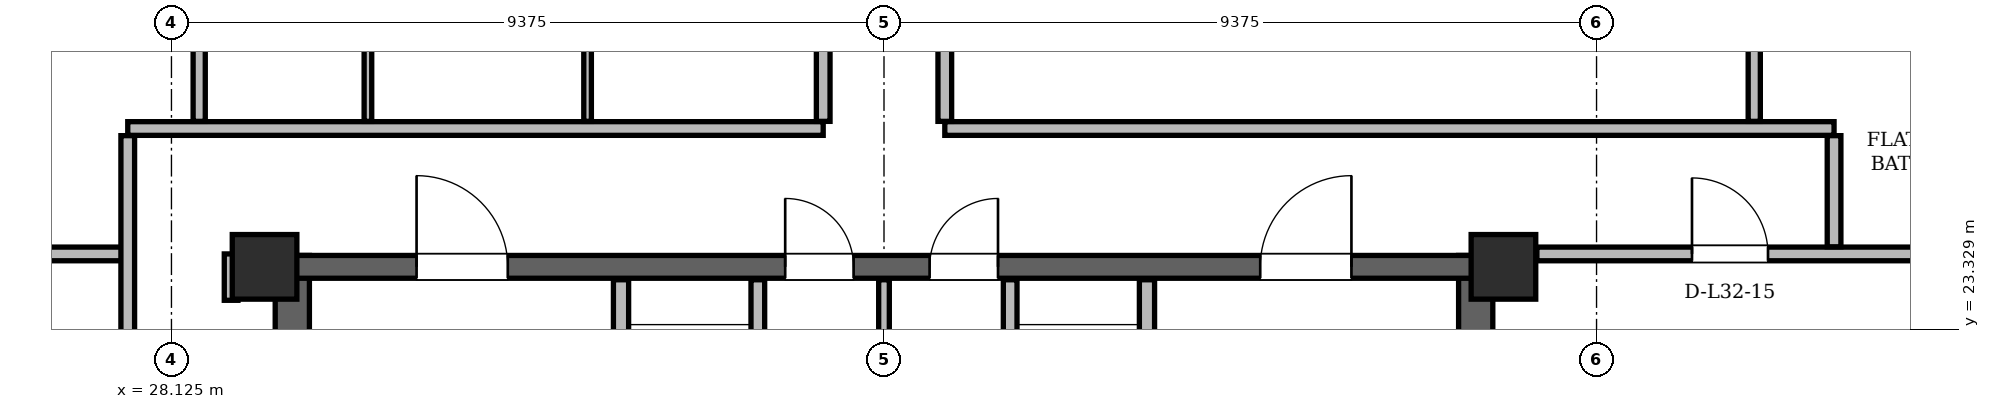
"""IFC4 building model, lengths in metres.
Left out: names, types, materials, properties, quantities, classifications, styles, units other than length and angle.
Written with IfcOpenShell. Run it as: python <this file> out.ifc"""

import sys

from ifc_helpers import new_model, si_unit, direction, frame, frame_2d, origin, origin_2d, place, context, subcontext, project, spatial, rectangle, hollow_rectangle, extrude, element, fill, save


model = new_model("IFC4")
c1 = context("Model", 3, precision=1e-05, world=origin(), true_north=direction((0.0, 1.0)))
c2 = subcontext(c1, "Body", "Model", "MODEL_VIEW")
j1 = project(units=[si_unit("LENGTHUNIT", "METRE"), si_unit("PLANEANGLEUNIT", "RADIAN")], contexts=[c1])
p1 = place(None, origin())
s1 = spatial("IfcSite", under=j1, at=p1, CompositionType="ELEMENT")
p2 = place(p1, origin())
s2 = spatial("IfcBuilding", under=s1, at=p2, CompositionType="ELEMENT")
p3 = place(p2, frame((0.0, 0.0, 123.0)))
s3 = spatial("IfcBuildingStorey", under=s2, at=p3, CompositionType="ELEMENT", Elevation=123.0)
for number, where, z_axis, x_axis in (
    (1, (45.65, 24.15, 0.0), (0.0, 0.0, 1.0), (1.0, 0.0, 0.0)),
    (2, (29.35, 24.15, 0.0), (0.0, 0.0, 1.0), (1.0, 0.0, 0.0)),
):
    element("IfcColumn", number, at=place(p3, frame(where, z_axis=z_axis, x_axis=x_axis)), inside=s3, PredefinedType="COLUMN", context=c2, shape_type="SweptSolid", body=[
        extrude(hollow_rectangle(XDim=0.85, YDim=0.85, WallThickness=0.07, at=origin_2d()), origin(), (0.0, 0.0, 1.0), 3.6),
    ])
for number, where, z_axis, x_axis in (
    (3, (29.715, 11.0, 0.0), (0.0, 0.0, 1.0), (0.0, 1.0, 0.0)),
    (4, (45.285, 11.0, 0.0), (0.0, 0.0, 1.0), (0.0, 1.0, 0.0)),
):
    element("IfcWall", number, at=place(p3, frame(where, z_axis=z_axis, x_axis=x_axis)), inside=s3, PredefinedType="SHEAR", context=c2, shape_type="SweptSolid", body=[
        extrude(rectangle(XDim=13.3, YDim=0.45, at=frame_2d((6.65, 0.0))), origin(), (0.0, 0.0, 1.0), 3.36),
    ])
p4 = place(p3, frame((29.65, 24.15, 0.0), z_axis=(0.0, 0.0, 1.0), x_axis=(1.0, 0.0, 0.0)))
e5 = element("IfcWall", 5, at=p4, inside=s3, PredefinedType="SHEAR", context=c2, shape_type="SweptSolid", body=[
    extrude(rectangle(XDim=15.7, YDim=0.3, at=frame_2d((7.85, 0.0))), origin(), (0.0, 0.0, 1.0), 3.36),
])
p5 = place(p4, frame((1.7, 0.0, 0.0)))
e6 = element("IfcOpeningElement", 6, at=p5, cuts=e5, PredefinedType="OPENING", context=c2, shape_type="SweptSolid", body=[
    extrude(rectangle(XDim=1.2, YDim=2.2, at=frame_2d((0.6, 1.1))), frame((0.0, 0.15, 0.0), z_axis=(0.0, -1.0, 0.0), x_axis=(1.0, 0.0, 0.0)), (0.0, 0.0, 1.0), 0.3),
])
p6 = place(p4, frame((12.8, 0.0, 0.0)))
e7 = element("IfcOpeningElement", 7, at=p6, cuts=e5, PredefinedType="OPENING", context=c2, shape_type="SweptSolid", body=[
    extrude(rectangle(XDim=1.2, YDim=2.2, at=frame_2d((0.6, 1.1))), frame((0.0, 0.15, 0.0), z_axis=(0.0, -1.0, 0.0), x_axis=(1.0, 0.0, 0.0)), (0.0, 0.0, 1.0), 0.3),
])
p7 = place(p4, frame((6.55, 0.0, 0.0)))
e8 = element("IfcOpeningElement", 8, at=p7, cuts=e5, PredefinedType="OPENING", context=c2, shape_type="SweptSolid", body=[
    extrude(rectangle(XDim=0.9, YDim=2.05, at=frame_2d((0.45, 1.025))), frame((0.0, 0.15, 0.0), z_axis=(0.0, -1.0, 0.0), x_axis=(1.0, 0.0, 0.0)), (0.0, 0.0, 1.0), 0.3),
])
p8 = place(p4, frame((8.45, 0.0, 0.0)))
e9 = element("IfcOpeningElement", 9, at=p8, cuts=e5, PredefinedType="OPENING", context=c2, shape_type="SweptSolid", body=[
    extrude(rectangle(XDim=0.9, YDim=2.05, at=frame_2d((0.45, 1.025))), frame((0.0, 0.15, 0.0), z_axis=(0.0, -1.0, 0.0), x_axis=(1.0, 0.0, 0.0)), (0.0, 0.0, 1.0), 0.3),
])
p9 = place(p3, frame((60.364, 13.107, 0.0), z_axis=(0.0, 0.0, 1.0), x_axis=(-0.499996370967, 0.866027498997, 0.0)))
e10 = element("IfcWall", 10, at=p9, inside=s3, PredefinedType="SOLIDWALL", context=c2, shape_type="SweptSolid", body=[
    extrude(rectangle(XDim=34.976, YDim=0.34, at=frame_2d((17.488, 0.0))), origin(), (0.0, 0.0, 1.0), 2.578),
])
p10 = place(p9, frame((8.034, 0.0, 0.0)))
e11 = element("IfcOpeningElement", 11, at=p10, cuts=e10, PredefinedType="OPENING", context=c2, shape_type="SweptSolid", body=[
    extrude(rectangle(XDim=1.5, YDim=2.2, at=frame_2d((0.75, 1.1))), frame((0.0, 0.17, 0.0), z_axis=(0.0, -1.0, 0.0), x_axis=(1.0, 0.0, 0.0)), (0.0, 0.0, 1.0), 0.34),
])
p11 = place(p9, frame((27.106, 0.0, 0.0)))
e12 = element("IfcOpeningElement", 12, at=p11, cuts=e10, PredefinedType="OPENING", context=c2, shape_type="SweptSolid", body=[
    extrude(rectangle(XDim=1.5, YDim=2.2, at=frame_2d((0.75, 1.1))), frame((0.0, 0.17, 0.0), z_axis=(0.0, -1.0, 0.0), x_axis=(1.0, 0.0, 0.0)), (0.0, 0.0, 1.0), 0.34),
])
p12 = place(p9, frame((3.285, 0.0, 0.85)))
e13 = element("IfcOpeningElement", 13, at=p12, cuts=e10, PredefinedType="OPENING", context=c2, shape_type="SweptSolid", body=[
    extrude(rectangle(XDim=1.2, YDim=1.48, at=frame_2d((0.6, 0.74))), frame((0.0, 0.17, 0.0), z_axis=(0.0, -1.0, 0.0), x_axis=(1.0, 0.0, 0.0)), (0.0, 0.0, 1.0), 0.34),
])
p13 = place(p9, frame((11.406, 0.0, 0.85)))
e14 = element("IfcOpeningElement", 14, at=p13, cuts=e10, PredefinedType="OPENING", context=c2, shape_type="SweptSolid", body=[
    extrude(rectangle(XDim=1.2, YDim=1.48, at=frame_2d((0.6, 0.74))), frame((0.0, 0.17, 0.0), z_axis=(0.0, -1.0, 0.0), x_axis=(1.0, 0.0, 0.0)), (0.0, 0.0, 1.0), 0.34),
])
p14 = place(p9, frame((31.066, 0.0, 0.85)))
e15 = element("IfcOpeningElement", 15, at=p14, cuts=e10, PredefinedType="OPENING", context=c2, shape_type="SweptSolid", body=[
    extrude(rectangle(XDim=2.2, YDim=1.618, at=frame_2d((1.1, 0.809))), frame((0.0, 0.17, 0.0), z_axis=(0.0, -1.0, 0.0), x_axis=(1.0, 0.0, 0.0)), (0.0, 0.0, 1.0), 0.34),
])
p15 = place(p9, frame((14.149, 0.0, 0.85)))
e16 = element("IfcOpeningElement", 16, at=p15, cuts=e10, PredefinedType="OPENING", context=c2, shape_type="SweptSolid", body=[
    extrude(rectangle(XDim=2.6, YDim=1.618, at=frame_2d((1.3, 0.809))), frame((0.0, 0.17, 0.0), z_axis=(0.0, -1.0, 0.0), x_axis=(1.0, 0.0, 0.0)), (0.0, 0.0, 1.0), 0.34),
])
p16 = place(p9, frame((18.924, 0.0, 0.85)))
e17 = element("IfcOpeningElement", 17, at=p16, cuts=e10, PredefinedType="OPENING", context=c2, shape_type="SweptSolid", body=[
    extrude(rectangle(XDim=2.0, YDim=1.618, at=frame_2d((1.0, 0.809))), frame((0.0, 0.17, 0.0), z_axis=(0.0, -1.0, 0.0), x_axis=(1.0, 0.0, 0.0)), (0.0, 0.0, 1.0), 0.34),
])
p17 = place(p3, frame((32.124, 43.397, 0.0), z_axis=(0.0, 0.0, 1.0), x_axis=(-0.499996370967, -0.866027498997, 0.0)))
e18 = element("IfcWall", 18, at=p17, inside=s3, PredefinedType="SOLIDWALL", context=c2, shape_type="SweptSolid", body=[
    extrude(rectangle(XDim=34.976, YDim=0.34, at=frame_2d((17.488, 0.0))), origin(), (0.0, 0.0, 1.0), 2.578),
])
p18 = place(p17, frame((8.034, 0.0, 0.0)))
e19 = element("IfcOpeningElement", 19, at=p18, cuts=e18, PredefinedType="OPENING", context=c2, shape_type="SweptSolid", body=[
    extrude(rectangle(XDim=1.5, YDim=2.2, at=frame_2d((0.75, 1.1))), frame((0.0, 0.17, 0.0), z_axis=(0.0, -1.0, 0.0), x_axis=(1.0, 0.0, 0.0)), (0.0, 0.0, 1.0), 0.34),
])
p19 = place(p17, frame((26.896, 0.0, 0.0)))
e20 = element("IfcOpeningElement", 20, at=p19, cuts=e18, PredefinedType="OPENING", context=c2, shape_type="SweptSolid", body=[
    extrude(rectangle(XDim=1.5, YDim=2.2, at=frame_2d((0.75, 1.1))), frame((0.0, 0.17, 0.0), z_axis=(0.0, -1.0, 0.0), x_axis=(1.0, 0.0, 0.0)), (0.0, 0.0, 1.0), 0.34),
])
p20 = place(p17, frame((32.562, 0.0, 0.85)))
e21 = element("IfcOpeningElement", 21, at=p20, cuts=e18, PredefinedType="OPENING", context=c2, shape_type="SweptSolid", body=[
    extrude(rectangle(XDim=1.4, YDim=1.6, at=frame_2d((0.7, 0.8))), frame((0.0, 0.17, 0.0), z_axis=(0.0, -1.0, 0.0), x_axis=(1.0, 0.0, 0.0)), (0.0, 0.0, 1.0), 0.34),
])
p21 = place(p17, frame((22.614, 0.0, 0.85)))
e22 = element("IfcOpeningElement", 22, at=p21, cuts=e18, PredefinedType="OPENING", context=c2, shape_type="SweptSolid", body=[
    extrude(rectangle(XDim=1.2, YDim=1.48, at=frame_2d((0.6, 0.74))), frame((0.0, 0.17, 0.0), z_axis=(0.0, -1.0, 0.0), x_axis=(1.0, 0.0, 0.0)), (0.0, 0.0, 1.0), 0.34),
])
p22 = place(p17, frame((2.415, 0.0, 0.85)))
e23 = element("IfcOpeningElement", 23, at=p22, cuts=e18, PredefinedType="OPENING", context=c2, shape_type="SweptSolid", body=[
    extrude(rectangle(XDim=1.4, YDim=1.6, at=frame_2d((0.7, 0.8))), frame((0.0, 0.17, 0.0), z_axis=(0.0, -1.0, 0.0), x_axis=(1.0, 0.0, 0.0)), (0.0, 0.0, 1.0), 0.34),
])
p23 = place(p17, frame((13.492, 0.0, 0.85)))
e24 = element("IfcOpeningElement", 24, at=p23, cuts=e18, PredefinedType="OPENING", context=c2, shape_type="SweptSolid", body=[
    extrude(rectangle(XDim=2.5, YDim=1.618, at=frame_2d((1.25, 0.809))), frame((0.0, 0.17, 0.0), z_axis=(0.0, -1.0, 0.0), x_axis=(1.0, 0.0, 0.0)), (0.0, 0.0, 1.0), 0.34),
])
p24 = place(p17, frame((18.281, 0.0, 0.85)))
e25 = element("IfcOpeningElement", 25, at=p24, cuts=e18, PredefinedType="OPENING", context=c2, shape_type="SweptSolid", body=[
    extrude(rectangle(XDim=1.2, YDim=1.48, at=frame_2d((0.6, 0.74))), frame((0.0, 0.17, 0.0), z_axis=(0.0, -1.0, 0.0), x_axis=(1.0, 0.0, 0.0)), (0.0, 0.0, 1.0), 0.34),
])
p25 = place(p17, frame((20.476, 0.0, 0.85)))
e26 = element("IfcOpeningElement", 26, at=p25, cuts=e18, PredefinedType="OPENING", context=c2, shape_type="SweptSolid", body=[
    extrude(rectangle(XDim=1.2, YDim=1.48, at=frame_2d((0.6, 0.74))), frame((0.0, 0.17, 0.0), z_axis=(0.0, -1.0, 0.0), x_axis=(1.0, 0.0, 0.0)), (0.0, 0.0, 1.0), 0.34),
])
p26 = place(p3, frame((34.04, 19.48, 0.0), z_axis=(0.0, 0.0, 1.0), x_axis=(0.0, 1.0, 0.0)))
e27 = element("IfcWall", 27, at=p26, inside=s3, PredefinedType="PARTITIONING", context=c2, shape_type="SweptSolid", body=[
    extrude(rectangle(XDim=4.5, YDim=0.2, at=frame_2d((2.25, 0.0))), origin(), (0.0, 0.0, 1.0), 2.4),
])
p27 = place(p26, frame((2.12, 0.0, 0.0)))
e28 = element("IfcOpeningElement", 28, at=p27, cuts=e27, PredefinedType="OPENING", context=c2, shape_type="SweptSolid", body=[
    extrude(rectangle(XDim=1.1, YDim=2.2, at=frame_2d((0.55, 1.1))), frame((0.0, 0.1, 0.0), z_axis=(0.0, -1.0, 0.0), x_axis=(1.0, 0.0, 0.0)), (0.0, 0.0, 1.0), 0.2),
])
p28 = place(p3, frame((35.84, 20.96, 0.0), z_axis=(0.0, 0.0, 1.0), x_axis=(0.0, 1.0, 0.0)))
e29 = element("IfcWall", 29, at=p28, inside=s3, PredefinedType="PARTITIONING", context=c2, shape_type="SweptSolid", body=[
    extrude(rectangle(XDim=3.02, YDim=0.18, at=frame_2d((1.51, 0.0))), origin(), (0.0, 0.0, 1.0), 2.4),
])
p29 = place(p3, frame((40.96, 19.48, 0.0), z_axis=(0.0, 0.0, 1.0), x_axis=(0.0, 1.0, 0.0)))
e30 = element("IfcWall", 30, at=p29, inside=s3, PredefinedType="PARTITIONING", context=c2, shape_type="SweptSolid", body=[
    extrude(rectangle(XDim=4.5, YDim=0.2, at=frame_2d((2.25, 0.0))), origin(), (0.0, 0.0, 1.0), 2.4),
])
p30 = place(p29, frame((2.12, 0.0, 0.0)))
e31 = element("IfcOpeningElement", 31, at=p30, cuts=e30, PredefinedType="OPENING", context=c2, shape_type="SweptSolid", body=[
    extrude(rectangle(XDim=1.1, YDim=2.2, at=frame_2d((0.55, 1.1))), frame((0.0, 0.1, 0.0), z_axis=(0.0, -1.0, 0.0), x_axis=(1.0, 0.0, 0.0)), (0.0, 0.0, 1.0), 0.2),
])
p31 = place(p3, frame((39.16, 20.96, 0.0), z_axis=(0.0, 0.0, 1.0), x_axis=(0.0, 1.0, 0.0)))
e32 = element("IfcWall", 32, at=p31, inside=s3, PredefinedType="PARTITIONING", context=c2, shape_type="SweptSolid", body=[
    extrude(rectangle(XDim=3.02, YDim=0.18, at=frame_2d((1.51, 0.0))), origin(), (0.0, 0.0, 1.0), 2.4),
])
p32 = place(p3, frame((37.5, 21.06, 0.0), z_axis=(0.0, 0.0, 1.0), x_axis=(0.0, 1.0, 0.0)))
e33 = element("IfcWall", 33, at=p32, inside=s3, PredefinedType="PARTITIONING", context=c2, shape_type="SweptSolid", body=[
    extrude(rectangle(XDim=2.92, YDim=0.14, at=frame_2d((1.46, 0.0))), origin(), (0.0, 0.0, 1.0), 2.4),
])
p33 = place(p3, frame((21.311, 24.32, 0.0), z_axis=(0.0, 0.0, 1.0), x_axis=(1.0, 0.0, 0.0)))
e34 = element("IfcWall", 34, at=p33, inside=s3, PredefinedType="PARTITIONING", context=c2, shape_type="SweptSolid", body=[
    extrude(rectangle(XDim=6.299, YDim=0.18, at=frame_2d((3.149, 0.0))), origin(), (0.0, 0.0, 1.0), 3.36),
])
p34 = place(p3, frame((46.09, 24.32, 0.0), z_axis=(0.0, 0.0, 1.0), x_axis=(1.0, 0.0, 0.0)))
e35 = element("IfcWall", 35, at=p34, inside=s3, PredefinedType="PARTITIONING", context=c2, shape_type="SweptSolid", body=[
    extrude(rectangle(XDim=7.599, YDim=0.18, at=frame_2d((3.799, 0.0))), origin(), (0.0, 0.0, 1.0), 3.36),
])
p35 = place(p34, frame((2.041, 0.0, 0.0)))
e36 = element("IfcOpeningElement", 36, at=p35, cuts=e35, PredefinedType="OPENING", context=c2, shape_type="SweptSolid", body=[
    extrude(rectangle(XDim=1.0, YDim=2.18, at=frame_2d((0.5, 1.09))), frame((0.0, 0.09, 0.0), z_axis=(0.0, -1.0, 0.0), x_axis=(1.0, 0.0, 0.0)), (0.0, 0.0, 1.0), 0.18),
])
p36 = place(p3, frame((27.55, 25.97, 0.0), z_axis=(0.0, 0.0, 1.0), x_axis=(1.0, 0.0, 0.0)))
e37 = element("IfcWall", 37, at=p36, inside=s3, PredefinedType="PARTITIONING", context=c2, shape_type="SweptSolid", body=[
    extrude(rectangle(XDim=9.15, YDim=0.18, at=frame_2d((4.575, 0.0))), origin(), (0.0, 0.0, 1.0), 2.814),
])
p37 = place(p3, frame((38.3, 25.97, 0.0), z_axis=(0.0, 0.0, 1.0), x_axis=(1.0, 0.0, 0.0)))
e38 = element("IfcWall", 38, at=p37, inside=s3, PredefinedType="PARTITIONING", context=c2, shape_type="SweptSolid", body=[
    extrude(rectangle(XDim=11.7, YDim=0.18, at=frame_2d((5.85, 0.0))), origin(), (0.0, 0.0, 1.0), 2.814),
])
p38 = place(p3, frame((27.55, 18.544, 0.0), z_axis=(0.0, 0.0, 1.0), x_axis=(0.0, 1.0, 0.0)))
e39 = element("IfcWall", 39, at=p38, inside=s3, PredefinedType="PARTITIONING", context=c2, shape_type="SweptSolid", body=[
    extrude(rectangle(XDim=7.332, YDim=0.18, at=frame_2d((3.666, 0.0))), origin(), (0.0, 0.0, 1.0), 3.36),
])
p39 = place(p3, frame((28.49, 26.064, 0.0), z_axis=(0.0, 0.0, 1.0), x_axis=(0.0, 1.0, 0.0)))
e40 = element("IfcWall", 40, at=p39, inside=s3, PredefinedType="PARTITIONING", context=c2, shape_type="SweptSolid", body=[
    extrude(rectangle(XDim=1.542, YDim=0.16, at=frame_2d((0.771, 0.0))), origin(), (0.0, 0.0, 1.0), 3.36),
])
p40 = place(p3, frame((28.91, 23.71, 0.0), z_axis=(0.0, 0.0, 1.0), x_axis=(0.0, 1.0, 0.0)))
e41 = element("IfcWall", 41, at=p40, inside=s3, PredefinedType="PARTITIONING", context=c2, shape_type="SweptSolid", body=[
    extrude(rectangle(XDim=0.61, YDim=0.18, at=frame_2d((0.305, 0.0))), origin(), (0.0, 0.0, 1.0), 3.36),
])
for number, where, z_axis, x_axis in (
    (42, (30.71, 26.064, 0.0), (0.0, 0.0, 1.0), (0.0, 1.0, 0.0)),
    (43, (33.6, 26.064, 0.0), (0.0, 0.0, 1.0), (0.0, 1.0, 0.0)),
):
    element("IfcWall", number, at=place(p3, frame(where, z_axis=z_axis, x_axis=x_axis)), inside=s3, PredefinedType="PARTITIONING", context=c2, shape_type="SweptSolid", body=[
        extrude(rectangle(XDim=1.542, YDim=0.1, at=frame_2d((0.771, 0.0))), origin(), (0.0, 0.0, 1.0), 3.36),
    ])
p41 = place(p3, frame((36.7, 26.064, 0.0), z_axis=(0.0, 0.0, 1.0), x_axis=(0.0, 1.0, 0.0)))
e44 = element("IfcWall", 44, at=p41, inside=s3, PredefinedType="PARTITIONING", context=c2, shape_type="SweptSolid", body=[
    extrude(rectangle(XDim=17.159, YDim=0.18, at=frame_2d((8.58, 0.0))), origin(), (0.0, 0.0, 1.0), 3.36),
])
p42 = place(p41, frame((7.06, 0.0, 0.0)))
e45 = element("IfcOpeningElement", 45, at=p42, cuts=e44, PredefinedType="OPENING", context=c2, shape_type="SweptSolid", body=[
    extrude(rectangle(XDim=1.0, YDim=2.18, at=frame_2d((0.5, 1.09))), frame((0.0, 0.09, 0.0), z_axis=(0.0, -1.0, 0.0), x_axis=(1.0, 0.0, 0.0)), (0.0, 0.0, 1.0), 0.18),
])
p43 = place(p3, frame((38.3, 26.064, 0.0), z_axis=(0.0, 0.0, 1.0), x_axis=(0.0, 1.0, 0.0)))
e46 = element("IfcWall", 46, at=p43, inside=s3, PredefinedType="PARTITIONING", context=c2, shape_type="SweptSolid", body=[
    extrude(rectangle(XDim=13.442, YDim=0.18, at=frame_2d((6.721, 0.0))), origin(), (0.0, 0.0, 1.0), 3.36),
])
p44 = place(p43, frame((6.146, 0.0, 0.0)))
e47 = element("IfcOpeningElement", 47, at=p44, cuts=e46, PredefinedType="OPENING", context=c2, shape_type="SweptSolid", body=[
    extrude(rectangle(XDim=1.0, YDim=2.18, at=frame_2d((0.5, 1.09))), frame((0.0, 0.09, 0.0), z_axis=(0.0, -1.0, 0.0), x_axis=(1.0, 0.0, 0.0)), (0.0, 0.0, 1.0), 0.18),
])
p45 = place(p3, frame((48.95, 26.064, 0.0), z_axis=(0.0, 0.0, 1.0), x_axis=(0.0, 1.0, 0.0)))
e48 = element("IfcWall", 48, at=p45, inside=s3, PredefinedType="PARTITIONING", context=c2, shape_type="SweptSolid", body=[
    extrude(rectangle(XDim=6.464, YDim=0.16, at=frame_2d((3.232, 0.0))), origin(), (0.0, 0.0, 1.0), 2.578),
])
p46 = place(p45, frame((2.77, 0.0, 0.0)))
e49 = element("IfcOpeningElement", 49, at=p46, cuts=e48, PredefinedType="OPENING", context=c2, shape_type="SweptSolid", body=[
    extrude(rectangle(XDim=0.88, YDim=2.08, at=frame_2d((0.44, 1.04))), frame((0.0, 0.08, 0.0), z_axis=(0.0, -1.0, 0.0), x_axis=(1.0, 0.0, 0.0)), (0.0, 0.0, 1.0), 0.16),
])
p47 = place(p3, frame((50.0, 24.414, 0.0), z_axis=(0.0, 0.0, 1.0), x_axis=(0.0, 1.0, 0.0)))
e50 = element("IfcWall", 50, at=p47, inside=s3, PredefinedType="PARTITIONING", context=c2, shape_type="SweptSolid", body=[
    extrude(rectangle(XDim=1.462, YDim=0.18, at=frame_2d((0.731, 0.0))), origin(), (0.0, 0.0, 1.0), 3.36),
])
p48 = place(p5, origin())
e51 = element("IfcDoor", 51, at=p48, inside=s3, OperationType="SINGLE_SWING_LEFT", PredefinedType="DOOR", context=c2, shape_type="SweptSolid", body=[
    extrude(rectangle(XDim=1.2, YDim=2.2, at=frame_2d((0.6, 1.1))), frame((0.0, 0.025, 0.0), z_axis=(0.0, -1.0, 0.0), x_axis=(1.0, 0.0, 0.0)), (0.0, 0.0, 1.0), 0.05),
])
fill(e6, e51)
p49 = place(p6, origin())
e52 = element("IfcDoor", 52, at=p49, inside=s3, OperationType="SINGLE_SWING_RIGHT", PredefinedType="DOOR", context=c2, shape_type="SweptSolid", body=[
    extrude(rectangle(XDim=1.2, YDim=2.2, at=frame_2d((0.6, 1.1))), frame((0.0, 0.025, 0.0), z_axis=(0.0, -1.0, 0.0), x_axis=(1.0, 0.0, 0.0)), (0.0, 0.0, 1.0), 0.05),
])
fill(e7, e52)
p50 = place(p7, origin())
e53 = element("IfcDoor", 53, at=p50, inside=s3, OperationType="SINGLE_SWING_LEFT", PredefinedType="DOOR", context=c2, shape_type="SweptSolid", body=[
    extrude(rectangle(XDim=0.9, YDim=2.05, at=frame_2d((0.45, 1.025))), frame((0.0, 0.025, 0.0), z_axis=(0.0, -1.0, 0.0), x_axis=(1.0, 0.0, 0.0)), (0.0, 0.0, 1.0), 0.05),
])
fill(e8, e53)
p51 = place(p8, origin())
e54 = element("IfcDoor", 54, at=p51, inside=s3, OperationType="SINGLE_SWING_RIGHT", PredefinedType="DOOR", context=c2, shape_type="SweptSolid", body=[
    extrude(rectangle(XDim=0.9, YDim=2.05, at=frame_2d((0.45, 1.025))), frame((0.0, 0.025, 0.0), z_axis=(0.0, -1.0, 0.0), x_axis=(1.0, 0.0, 0.0)), (0.0, 0.0, 1.0), 0.05),
])
fill(e9, e54)
p52 = place(p35, origin())
e55 = element("IfcDoor", 55, at=p52, inside=s3, OperationType="SINGLE_SWING_LEFT", PredefinedType="DOOR", context=c2, shape_type="SweptSolid", body=[
    extrude(rectangle(XDim=1.0, YDim=2.18, at=frame_2d((0.5, 1.09))), frame((0.0, 0.025, 0.0), z_axis=(0.0, -1.0, 0.0), x_axis=(1.0, 0.0, 0.0)), (0.0, 0.0, 1.0), 0.05),
])
fill(e36, e55)
save(model, sys.argv[1])
